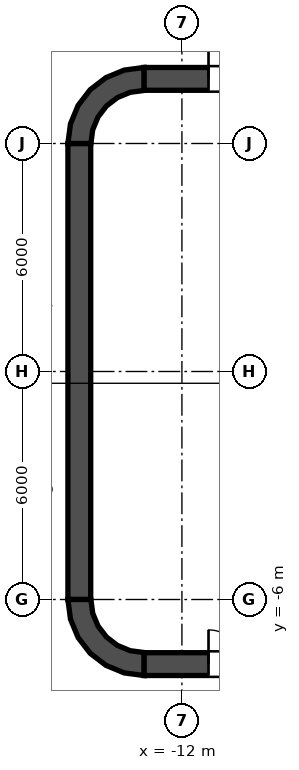
"""IFC4 building model, lengths in metres.
Left out: names, types, materials, properties, quantities, classifications, styles, units other than length and angle.
Written with IfcOpenShell. Run it as: python <this file> out.ifc"""

import sys

from ifc_helpers import new_model, si_unit, direction, frame, frame_2d, origin, place, context, subcontext, project, spatial, polyline, rectangle, outline, extrude, element, fill, save


model = new_model("IFC4")
c1 = context("Model", 3, precision=1e-05, world=origin(), true_north=direction((0.0, 1.0)))
c2 = subcontext(c1, "Body", "Model", "MODEL_VIEW")
j1 = project(units=[si_unit("LENGTHUNIT", "METRE"), si_unit("PLANEANGLEUNIT", "RADIAN")], contexts=[c1])
p1 = place(None, origin())
s1 = spatial("IfcSite", under=j1, at=p1, CompositionType="ELEMENT")
p2 = place(p1, origin())
s2 = spatial("IfcBuilding", under=s1, at=p2, CompositionType="ELEMENT")
p3 = place(p2, frame((0.0, 0.0, 31.4)))
s3 = spatial("IfcBuildingStorey", under=s2, at=p3, CompositionType="ELEMENT", Elevation=31.4)
p4 = place(p3, frame((-13.0, 7.7, 0.0), z_axis=(0.0, 0.0, 1.0), x_axis=(1.0, 0.0, 0.0)))
e1 = element("IfcWall", 1, at=p4, inside=s3, PredefinedType="SHEAR", context=c2, shape_type="SweptSolid", body=[
    extrude(rectangle(XDim=26.0, YDim=0.6, at=frame_2d((13.0, 0.0))), origin(), (0.0, 0.0, 1.0), 6.0),
])
p5 = place(p4, frame((1.7, 0.0, 0.0)))
e2 = element("IfcOpeningElement", 2, at=p5, cuts=e1, PredefinedType="OPENING", context=c2, shape_type="SweptSolid", body=[
    extrude(rectangle(XDim=1.8, YDim=2.1, at=frame_2d((0.9, 1.05))), frame((0.0, 0.3, 0.0), z_axis=(0.0, -1.0, 0.0), x_axis=(1.0, 0.0, 0.0)), (0.0, 0.0, 1.0), 0.6),
])
p6 = place(p4, frame((22.5, 0.0, 0.0)))
e3 = element("IfcOpeningElement", 3, at=p6, cuts=e1, PredefinedType="OPENING", context=c2, shape_type="SweptSolid", body=[
    extrude(rectangle(XDim=1.8, YDim=2.1, at=frame_2d((0.9, 1.05))), frame((0.0, 0.3, 0.0), z_axis=(0.0, -1.0, 0.0), x_axis=(1.0, 0.0, 0.0)), (0.0, 0.0, 1.0), 0.6),
])
p7 = place(p3, frame((-13.0, -7.7, 0.0), z_axis=(0.0, 0.0, 1.0), x_axis=(1.0, 0.0, 0.0)))
e4 = element("IfcWall", 4, at=p7, inside=s3, PredefinedType="SHEAR", context=c2, shape_type="SweptSolid", body=[
    extrude(rectangle(XDim=26.0, YDim=0.6, at=frame_2d((13.0, 0.0))), origin(), (0.0, 0.0, 1.0), 6.0),
])
p8 = place(p7, frame((1.7, 0.0, 0.0)))
e5 = element("IfcOpeningElement", 5, at=p8, cuts=e4, PredefinedType="OPENING", context=c2, shape_type="SweptSolid", body=[
    extrude(rectangle(XDim=1.8, YDim=2.1, at=frame_2d((0.9, 1.05))), frame((0.0, 0.3, 0.0), z_axis=(0.0, -1.0, 0.0), x_axis=(1.0, 0.0, 0.0)), (0.0, 0.0, 1.0), 0.6),
])
p9 = place(p7, frame((22.5, 0.0, 0.0)))
e6 = element("IfcOpeningElement", 6, at=p9, cuts=e4, PredefinedType="OPENING", context=c2, shape_type="SweptSolid", body=[
    extrude(rectangle(XDim=1.8, YDim=2.1, at=frame_2d((0.9, 1.05))), frame((0.0, 0.3, 0.0), z_axis=(0.0, -1.0, 0.0), x_axis=(1.0, 0.0, 0.0)), (0.0, 0.0, 1.0), 0.6),
])
p10 = place(p3, frame((-14.7, -6.0, 0.0), z_axis=(0.0, 0.0, 1.0), x_axis=(0.0, 1.0, 0.0)))
e7 = element("IfcWall", 7, at=p10, inside=s3, PredefinedType="SHEAR", context=c2, shape_type="SweptSolid", body=[
    extrude(rectangle(XDim=12.0, YDim=0.6, at=frame_2d((6.0, 0.0))), origin(), (0.0, 0.0, 1.0), 6.0),
])
p11 = place(p3, origin())
e8 = element("IfcWall", 8, at=p11, inside=s3, PredefinedType="SHEAR", context=c2, shape_type="SweptSolid", body=[
    extrude(outline(polyline([(-15.0, 6.0), (-14.395, 6.0), (-14.347, 6.361), (-14.208, 6.698), (-13.986, 6.986), (-13.698, 7.208), (-13.361, 7.347), (-13.0, 7.395), (-13.0, 8.0), (-13.518, 7.932), (-14.0, 7.732), (-14.414, 7.414), (-14.732, 7.0), (-14.932, 6.518), (-15.0, 6.0)])), origin(), (0.0, 0.0, 1.0), 6.0),
])
e9 = element("IfcWall", 9, at=p11, inside=s3, PredefinedType="SHEAR", context=c2, shape_type="SweptSolid", body=[
    extrude(outline(polyline([(-13.0, -8.0), (-13.0, -7.395), (-13.361, -7.347), (-13.698, -7.208), (-13.986, -6.986), (-14.208, -6.698), (-14.347, -6.361), (-14.395, -6.0), (-15.0, -6.0), (-14.932, -6.518), (-14.732, -7.0), (-14.414, -7.414), (-14.0, -7.732), (-13.518, -7.932), (-13.0, -8.0)])), origin(), (0.0, 0.0, 1.0), 6.0),
])
p12 = place(p3, frame((-11.8, -7.4, 0.0), z_axis=(0.0, 0.0, 1.0), x_axis=(0.0, 1.0, 0.0)))
e10 = element("IfcWall", 10, at=p12, inside=s3, PredefinedType="SOLIDWALL", context=c2, shape_type="SweptSolid", body=[
    extrude(rectangle(XDim=14.8, YDim=0.4, at=frame_2d((7.4, 0.0))), origin(), (0.0, 0.0, 1.0), 5.8),
])
p13 = place(p12, frame((11.2, 0.0, 0.0)))
e11 = element("IfcOpeningElement", 11, at=p13, cuts=e10, PredefinedType="OPENING", context=c2, shape_type="SweptSolid", body=[
    extrude(rectangle(XDim=1.1, YDim=2.1, at=frame_2d((0.55, 1.05))), frame((0.0, 0.2, 0.0), z_axis=(0.0, -1.0, 0.0), x_axis=(1.0, 0.0, 0.0)), (0.0, 0.0, 1.0), 0.4),
])
p14 = place(p12, frame((8.3, 0.0, 0.0)))
e12 = element("IfcOpeningElement", 12, at=p14, cuts=e10, PredefinedType="OPENING", context=c2, shape_type="SweptSolid", body=[
    extrude(rectangle(XDim=1.1, YDim=2.1, at=frame_2d((0.55, 1.05))), frame((0.0, 0.2, 0.0), z_axis=(0.0, -1.0, 0.0), x_axis=(1.0, 0.0, 0.0)), (0.0, 0.0, 1.0), 0.4),
])
p15 = place(p12, frame((5.4, 0.0, 0.0)))
e13 = element("IfcOpeningElement", 13, at=p15, cuts=e10, PredefinedType="OPENING", context=c2, shape_type="SweptSolid", body=[
    extrude(rectangle(XDim=1.1, YDim=2.1, at=frame_2d((0.55, 1.05))), frame((0.0, 0.2, 0.0), z_axis=(0.0, -1.0, 0.0), x_axis=(1.0, 0.0, 0.0)), (0.0, 0.0, 1.0), 0.4),
])
p16 = place(p12, frame((13.552, 0.0, 0.0)))
e14 = element("IfcOpeningElement", 14, at=p16, cuts=e10, PredefinedType="OPENING", context=c2, shape_type="SweptSolid", body=[
    extrude(rectangle(XDim=0.9, YDim=2.1, at=frame_2d((0.45, 1.05))), frame((0.0, 0.2, 0.0), z_axis=(0.0, -1.0, 0.0), x_axis=(1.0, 0.0, 0.0)), (0.0, 0.0, 1.0), 0.4),
])
p17 = place(p12, frame((0.347, 0.0, 0.0)))
e15 = element("IfcOpeningElement", 15, at=p17, cuts=e10, PredefinedType="OPENING", context=c2, shape_type="SweptSolid", body=[
    extrude(rectangle(XDim=0.9, YDim=2.1, at=frame_2d((0.45, 1.05))), frame((0.0, 0.2, 0.0), z_axis=(0.0, -1.0, 0.0), x_axis=(1.0, 0.0, 0.0)), (0.0, 0.0, 1.0), 0.4),
])
e16 = element("IfcWall", 16, at=p11, inside=s3, PredefinedType="SOLIDWALL", context=c2, shape_type="SweptSolid", body=[
    extrude(outline(polyline([(-12.0, -5.925), (-12.0, -5.675), (-14.15, -5.675), (-14.15, -3.025), (-12.0, -3.025), (-12.0, -2.775), (-14.15, -2.775), (-14.15, -0.125), (-12.0, -0.125), (-12.0, 0.125), (-14.15, 0.125), (-14.15, 2.775), (-12.0, 2.775), (-12.0, 3.025), (-14.15, 3.025), (-14.15, 5.675), (-12.0, 5.675), (-12.0, 5.925), (-14.15, 5.925), (-14.4, 5.925), (-14.4, 5.675), (-14.4, 3.025), (-14.4, 2.775), (-14.4, 0.125), (-14.4, -0.125), (-14.4, -2.775), (-14.4, -3.025), (-14.4, -5.675), (-14.4, -5.925), (-14.15, -5.925), (-12.0, -5.925)])), origin(), (0.0, 0.0, 1.0), 5.8),
])
p18 = place(p13, origin())
e17 = element("IfcDoor", 17, at=p18, inside=s3, OperationType="DOUBLE_DOOR_SLIDING", PredefinedType="DOOR", context=c2, shape_type="SweptSolid", body=[
    extrude(rectangle(XDim=1.1, YDim=2.1, at=frame_2d((0.55, 1.05))), frame((0.0, 0.025, 0.0), z_axis=(0.0, -1.0, 0.0), x_axis=(1.0, 0.0, 0.0)), (0.0, 0.0, 1.0), 0.05),
])
fill(e11, e17)
p19 = place(p14, origin())
e18 = element("IfcDoor", 18, at=p19, inside=s3, OperationType="DOUBLE_DOOR_SLIDING", PredefinedType="DOOR", context=c2, shape_type="SweptSolid", body=[
    extrude(rectangle(XDim=1.1, YDim=2.1, at=frame_2d((0.55, 1.05))), frame((0.0, 0.025, 0.0), z_axis=(0.0, -1.0, 0.0), x_axis=(1.0, 0.0, 0.0)), (0.0, 0.0, 1.0), 0.05),
])
fill(e12, e18)
p20 = place(p15, origin())
e19 = element("IfcDoor", 19, at=p20, inside=s3, OperationType="DOUBLE_DOOR_SLIDING", PredefinedType="DOOR", context=c2, shape_type="SweptSolid", body=[
    extrude(rectangle(XDim=1.1, YDim=2.1, at=frame_2d((0.55, 1.05))), frame((0.0, 0.025, 0.0), z_axis=(0.0, -1.0, 0.0), x_axis=(1.0, 0.0, 0.0)), (0.0, 0.0, 1.0), 0.05),
])
fill(e13, e19)
p21 = place(p16, origin())
e20 = element("IfcDoor", 20, at=p21, inside=s3, OperationType="SINGLE_SWING_LEFT", PredefinedType="DOOR", context=c2, shape_type="SweptSolid", body=[
    extrude(rectangle(XDim=0.9, YDim=2.1, at=frame_2d((0.45, 1.05))), frame((0.0, 0.025, 0.0), z_axis=(0.0, -1.0, 0.0), x_axis=(1.0, 0.0, 0.0)), (0.0, 0.0, 1.0), 0.05),
])
fill(e14, e20)
p22 = place(p17, origin())
e21 = element("IfcDoor", 21, at=p22, inside=s3, OperationType="SINGLE_SWING_LEFT", PredefinedType="DOOR", context=c2, shape_type="SweptSolid", body=[
    extrude(rectangle(XDim=0.9, YDim=2.1, at=frame_2d((0.45, 1.05))), frame((0.0, 0.025, 0.0), z_axis=(0.0, -1.0, 0.0), x_axis=(1.0, 0.0, 0.0)), (0.0, 0.0, 1.0), 0.05),
])
fill(e15, e21)
p23 = place(p5, origin())
e22 = element("IfcDoor", 22, at=p23, inside=s3, OperationType="DOUBLE_DOOR_SINGLE_SWING", PredefinedType="DOOR", context=c2, shape_type="SweptSolid", body=[
    extrude(rectangle(XDim=1.8, YDim=2.1, at=frame_2d((0.9, 1.05))), frame((0.0, 0.025, 0.0), z_axis=(0.0, -1.0, 0.0), x_axis=(1.0, 0.0, 0.0)), (0.0, 0.0, 1.0), 0.05),
])
fill(e2, e22)
p24 = place(p8, origin())
e23 = element("IfcDoor", 23, at=p24, inside=s3, OperationType="DOUBLE_DOOR_SINGLE_SWING", PredefinedType="DOOR", context=c2, shape_type="SweptSolid", body=[
    extrude(rectangle(XDim=1.8, YDim=2.1, at=frame_2d((0.9, 1.05))), frame((0.0, 0.025, 0.0), z_axis=(0.0, -1.0, 0.0), x_axis=(1.0, 0.0, 0.0)), (0.0, 0.0, 1.0), 0.05),
])
fill(e5, e23)
save(model, sys.argv[1])
